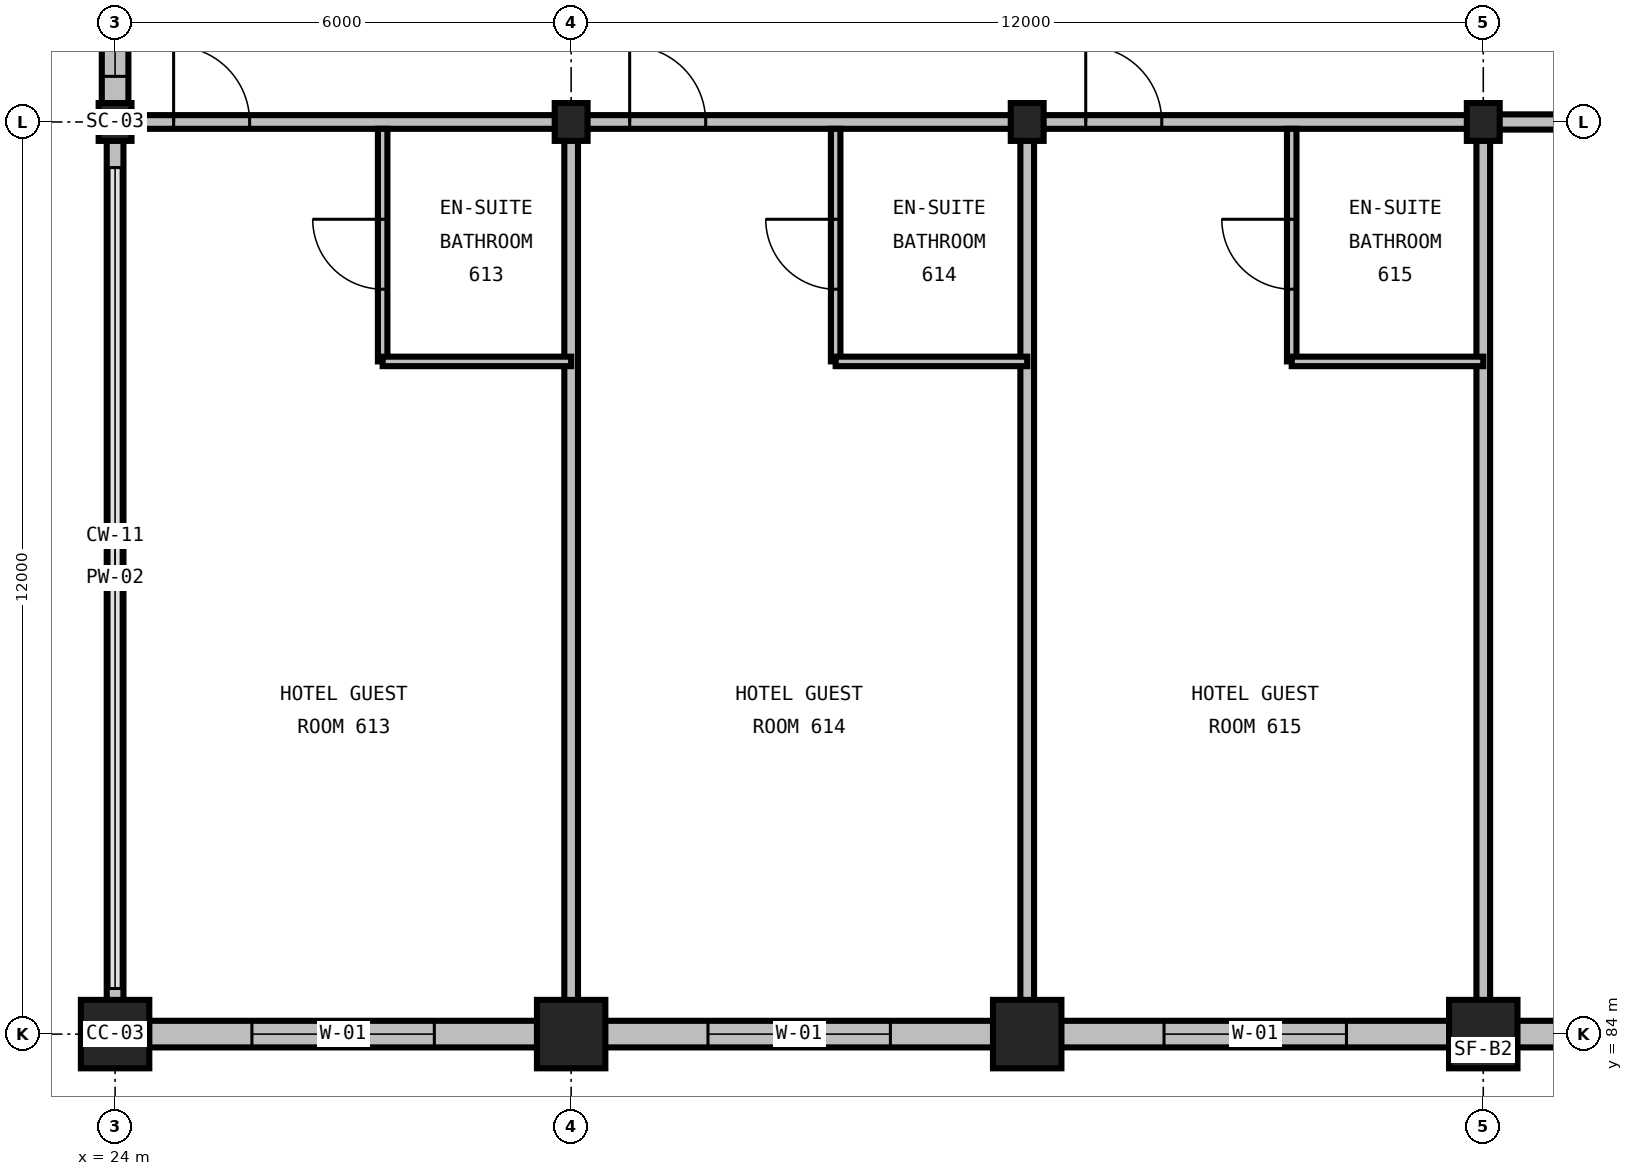
"""IFC4 building model, lengths in metres.
Left out: names, types, materials, properties, quantities, classifications, styles, units other than length and angle.
Written with IfcOpenShell. Run it as: python <this file> out.ifc"""

import sys

from ifc_helpers import new_model, si_unit, direction, frame, frame_2d, origin, origin_2d, place, context, subcontext, project, spatial, rectangle, i_section, extrude, element, fill, save


model = new_model("IFC4")
c1 = context("Model", 3, precision=1e-05, world=origin(), true_north=direction((0.0, 1.0)))
c2 = subcontext(c1, "Body", "Model", "MODEL_VIEW")
j1 = project(units=[si_unit("LENGTHUNIT", "METRE"), si_unit("PLANEANGLEUNIT", "RADIAN")], contexts=[c1])
p1 = place(None, origin())
s1 = spatial("IfcSite", under=j1, at=p1, CompositionType="ELEMENT")
p2 = place(p1, origin())
s2 = spatial("IfcBuilding", under=s1, at=p2, CompositionType="ELEMENT")
p3 = place(p2, frame((0.0, 0.0, 31.2)))
s3 = spatial("IfcBuildingStorey", under=s2, at=p3, CompositionType="ELEMENT", Elevation=31.2)
p4 = place(p3, frame((24.0, 84.0, 0.0), z_axis=(0.0, 0.0, 1.0), x_axis=(1.0, 0.0, 0.0)))
e1 = element("IfcColumn", 1, at=p4, inside=s3, PredefinedType="COLUMN", context=c2, shape_type="SweptSolid", body=[
    extrude(rectangle(XDim=0.9, YDim=0.9, at=origin_2d()), origin(), (0.0, 0.0, 1.0), 3.6),
])
p5 = place(p3, frame((24.0, 96.0, 0.0), z_axis=(0.0, 0.0, 1.0), x_axis=(1.0, 0.0, 0.0)))
e2 = element("IfcColumn", 2, at=p5, inside=s3, PredefinedType="COLUMN", context=c2, shape_type="SweptSolid", body=[
    extrude(i_section(OverallWidth=0.432, OverallDepth=0.498, WebThickness=0.056, FlangeThickness=0.089, FilletRadius=0.031, at=origin_2d()), origin(), (0.0, 0.0, 1.0), 3.6),
])
p6 = place(p3, frame((30.0, 84.0, 0.0), z_axis=(0.0, 0.0, 1.0), x_axis=(1.0, 0.0, 0.0)))
e3 = element("IfcColumn", 3, at=p6, inside=s3, PredefinedType="COLUMN", context=c2, shape_type="SweptSolid", body=[
    extrude(rectangle(XDim=0.9, YDim=0.9, at=origin_2d()), origin(), (0.0, 0.0, 1.0), 3.6),
])
p7 = place(p3, frame((30.0, 96.0, 0.0), z_axis=(0.0, 0.0, 1.0), x_axis=(1.0, 0.0, 0.0)))
e4 = element("IfcColumn", 4, at=p7, inside=s3, PredefinedType="COLUMN", context=c2, shape_type="SweptSolid", body=[
    extrude(i_section(OverallWidth=0.432, OverallDepth=0.498, WebThickness=0.056, FlangeThickness=0.089, FilletRadius=0.031, at=origin_2d()), origin(), (0.0, 0.0, 1.0), 3.6),
])
p8 = place(p3, frame((36.0, 84.0, 0.0), z_axis=(0.0, 0.0, 1.0), x_axis=(1.0, 0.0, 0.0)))
e5 = element("IfcColumn", 5, at=p8, inside=s3, PredefinedType="COLUMN", context=c2, shape_type="SweptSolid", body=[
    extrude(rectangle(XDim=0.9, YDim=0.9, at=origin_2d()), origin(), (0.0, 0.0, 1.0), 3.6),
])
p9 = place(p3, frame((36.0, 96.0, 0.0), z_axis=(0.0, 0.0, 1.0), x_axis=(1.0, 0.0, 0.0)))
e6 = element("IfcColumn", 6, at=p9, inside=s3, PredefinedType="COLUMN", context=c2, shape_type="SweptSolid", body=[
    extrude(i_section(OverallWidth=0.432, OverallDepth=0.498, WebThickness=0.056, FlangeThickness=0.089, FilletRadius=0.031, at=origin_2d()), origin(), (0.0, 0.0, 1.0), 3.6),
])
p10 = place(p3, frame((42.0, 84.0, 0.0), z_axis=(0.0, 0.0, 1.0), x_axis=(1.0, 0.0, 0.0)))
e7 = element("IfcColumn", 7, at=p10, inside=s3, PredefinedType="COLUMN", context=c2, shape_type="SweptSolid", body=[
    extrude(rectangle(XDim=0.9, YDim=0.9, at=origin_2d()), origin(), (0.0, 0.0, 1.0), 3.6),
])
p11 = place(p3, frame((42.0, 96.0, 0.0), z_axis=(0.0, 0.0, 1.0), x_axis=(1.0, 0.0, 0.0)))
e8 = element("IfcColumn", 8, at=p11, inside=s3, PredefinedType="COLUMN", context=c2, shape_type="SweptSolid", body=[
    extrude(i_section(OverallWidth=0.432, OverallDepth=0.498, WebThickness=0.056, FlangeThickness=0.089, FilletRadius=0.031, at=origin_2d()), origin(), (0.0, 0.0, 1.0), 3.6),
])
p12 = place(p3, frame((24.0, 84.0, 0.0), z_axis=(0.0, 0.0, 1.0), x_axis=(1.0, 0.0, 0.0)))
e9 = element("IfcWall", 9, at=p12, inside=s3, PredefinedType="STANDARD", context=c2, shape_type="SweptSolid", body=[
    extrude(rectangle(XDim=6.0, YDim=0.35, at=frame_2d((3.0, 0.0))), origin(), (0.0, 0.0, 1.0), 2.486),
])
p13 = place(p12, frame((1.8, 0.0, 0.75)))
e10 = element("IfcOpeningElement", 10, at=p13, cuts=e9, PredefinedType="OPENING", context=c2, shape_type="SweptSolid", body=[
    extrude(rectangle(XDim=2.4, YDim=1.65, at=frame_2d((1.2, 0.825))), frame((0.0, 0.19, 0.0), z_axis=(0.0, -1.0, 0.0), x_axis=(1.0, 0.0, 0.0)), (0.0, 0.0, 1.0), 0.38),
])
p14 = place(p3, frame((30.0, 84.0, 0.0), z_axis=(0.0, 0.0, 1.0), x_axis=(1.0, 0.0, 0.0)))
e11 = element("IfcWall", 11, at=p14, inside=s3, PredefinedType="STANDARD", context=c2, shape_type="SweptSolid", body=[
    extrude(rectangle(XDim=6.0, YDim=0.35, at=frame_2d((3.0, 0.0))), origin(), (0.0, 0.0, 1.0), 2.486),
])
p15 = place(p14, frame((1.8, 0.0, 0.75)))
e12 = element("IfcOpeningElement", 12, at=p15, cuts=e11, PredefinedType="OPENING", context=c2, shape_type="SweptSolid", body=[
    extrude(rectangle(XDim=2.4, YDim=1.65, at=frame_2d((1.2, 0.825))), frame((0.0, 0.19, 0.0), z_axis=(0.0, -1.0, 0.0), x_axis=(1.0, 0.0, 0.0)), (0.0, 0.0, 1.0), 0.38),
])
p16 = place(p3, frame((36.0, 84.0, 0.0), z_axis=(0.0, 0.0, 1.0), x_axis=(1.0, 0.0, 0.0)))
e13 = element("IfcWall", 13, at=p16, inside=s3, PredefinedType="STANDARD", context=c2, shape_type="SweptSolid", body=[
    extrude(rectangle(XDim=6.0, YDim=0.35, at=frame_2d((3.0, 0.0))), origin(), (0.0, 0.0, 1.0), 2.486),
])
p17 = place(p16, frame((1.8, 0.0, 0.75)))
e14 = element("IfcOpeningElement", 14, at=p17, cuts=e13, PredefinedType="OPENING", context=c2, shape_type="SweptSolid", body=[
    extrude(rectangle(XDim=2.4, YDim=1.65, at=frame_2d((1.2, 0.825))), frame((0.0, 0.19, 0.0), z_axis=(0.0, -1.0, 0.0), x_axis=(1.0, 0.0, 0.0)), (0.0, 0.0, 1.0), 0.38),
])
p18 = place(p3, frame((42.0, 84.0, 0.0), z_axis=(0.0, 0.0, 1.0), x_axis=(1.0, 0.0, 0.0)))
e15 = element("IfcWall", 15, at=p18, inside=s3, PredefinedType="STANDARD", context=c2, shape_type="SweptSolid", body=[
    extrude(rectangle(XDim=12.0, YDim=0.35, at=frame_2d((6.0, 0.0))), origin(), (0.0, 0.0, 1.0), 2.486),
])
p19 = place(p18, frame((1.8, 0.0, 0.75)))
e16 = element("IfcOpeningElement", 16, at=p19, cuts=e15, PredefinedType="OPENING", context=c2, shape_type="SweptSolid", body=[
    extrude(rectangle(XDim=2.4, YDim=1.65, at=frame_2d((1.2, 0.825))), frame((0.0, 0.19, 0.0), z_axis=(0.0, -1.0, 0.0), x_axis=(1.0, 0.0, 0.0)), (0.0, 0.0, 1.0), 0.38),
])
p20 = place(p18, frame((7.725, 0.0, 0.75)))
e17 = element("IfcOpeningElement", 17, at=p20, cuts=e15, PredefinedType="OPENING", context=c2, shape_type="SweptSolid", body=[
    extrude(rectangle(XDim=2.55, YDim=1.65, at=frame_2d((1.275, 0.825))), frame((0.0, 0.19, 0.0), z_axis=(0.0, -1.0, 0.0), x_axis=(1.0, 0.0, 0.0)), (0.0, 0.0, 1.0), 0.38),
])
p21 = place(p3, frame((24.0, 96.0, 0.0), z_axis=(0.0, 0.0, 1.0), x_axis=(0.0, -1.0, 0.0)))
e18 = element("IfcWall", 18, at=p21, inside=s3, PredefinedType="PARAPET", context=c2, shape_type="SweptSolid", body=[
    extrude(rectangle(XDim=12.0, YDim=0.22, at=frame_2d((6.0, 0.0))), origin(), (0.0, 0.0, 1.0), 0.2),
])
p22 = place(p3, frame((24.0, 105.0, 0.0), z_axis=(0.0, 0.0, 1.0), x_axis=(0.0, -1.0, 0.0)))
e19 = element("IfcWall", 19, at=p22, inside=s3, PredefinedType="STANDARD", context=c2, shape_type="SweptSolid", body=[
    extrude(rectangle(XDim=9.0, YDim=0.35, at=frame_2d((4.5, 0.0))), origin(), (0.0, 0.0, 1.0), 2.981),
])
p23 = place(p22, frame((6.6, 0.0, 0.85)))
e20 = element("IfcOpeningElement", 20, at=p23, cuts=e19, PredefinedType="OPENING", context=c2, shape_type="SweptSolid", body=[
    extrude(rectangle(XDim=1.8, YDim=1.5, at=frame_2d((0.9, 0.75))), frame((0.0, 0.19, 0.0), z_axis=(0.0, -1.0, 0.0), x_axis=(1.0, 0.0, 0.0)), (0.0, 0.0, 1.0), 0.38),
])
p24 = place(p3, frame((42.0, 96.0, 0.0), z_axis=(0.0, 0.0, 1.0), x_axis=(1.0, 0.0, 0.0)))
e21 = element("IfcWall", 21, at=p24, inside=s3, PredefinedType="PARTITIONING", context=c2, shape_type="SweptSolid", body=[
    extrude(rectangle(XDim=6.0, YDim=0.2, at=frame_2d((3.0, 0.0))), origin(), (0.0, 0.0, 1.0), 2.359),
])
p25 = place(p24, frame((2.4, 0.0, 0.0)))
e22 = element("IfcOpeningElement", 22, at=p25, cuts=e21, PredefinedType="OPENING", context=c2, shape_type="SweptSolid", body=[
    extrude(rectangle(XDim=1.8, YDim=2.3, at=frame_2d((0.9, 1.15))), frame((0.0, 0.115, 0.0), z_axis=(0.0, -1.0, 0.0), x_axis=(1.0, 0.0, 0.0)), (0.0, 0.0, 1.0), 0.23),
])
p26 = place(p3, frame((42.0, 84.175, 0.0), z_axis=(0.0, 0.0, 1.0), x_axis=(0.0, 1.0, 0.0)))
e23 = element("IfcWall", 23, at=p26, inside=s3, PredefinedType="PARTITIONING", context=c2, shape_type="SweptSolid", body=[
    extrude(rectangle(XDim=11.825, YDim=0.18, at=frame_2d((5.913, 0.0))), origin(), (0.0, 0.0, 1.0), 2.59),
])
p27 = place(p3, frame((24.085, 96.0, 0.0), z_axis=(0.0, 0.0, 1.0), x_axis=(1.0, 0.0, 0.0)))
e24 = element("IfcWall", 24, at=p27, inside=s3, PredefinedType="PARTITIONING", context=c2, shape_type="SweptSolid", body=[
    extrude(rectangle(XDim=5.915, YDim=0.18, at=frame_2d((2.957, 0.0))), origin(), (0.0, 0.0, 1.0), 2.736),
])
p28 = place(p27, frame((0.685, 0.0, 0.0)))
e25 = element("IfcOpeningElement", 25, at=p28, cuts=e24, PredefinedType="OPENING", context=c2, shape_type="SweptSolid", body=[
    extrude(rectangle(XDim=1.0, YDim=2.15, at=frame_2d((0.5, 1.075))), frame((0.0, 0.105, 0.0), z_axis=(0.0, -1.0, 0.0), x_axis=(1.0, 0.0, 0.0)), (0.0, 0.0, 1.0), 0.21),
])
p29 = place(p3, frame((30.0, 84.175, 0.0), z_axis=(0.0, 0.0, 1.0), x_axis=(0.0, 1.0, 0.0)))
e26 = element("IfcWall", 26, at=p29, inside=s3, PredefinedType="PARTITIONING", context=c2, shape_type="SweptSolid", body=[
    extrude(rectangle(XDim=11.825, YDim=0.18, at=frame_2d((5.913, 0.0))), origin(), (0.0, 0.0, 1.0), 2.59),
])
p30 = place(p3, frame((27.52, 92.85, 0.0), z_axis=(0.0, 0.0, 1.0), x_axis=(0.0, 1.0, 0.0)))
e27 = element("IfcWall", 27, at=p30, inside=s3, PredefinedType="PARTITIONING", context=c2, shape_type="SweptSolid", body=[
    extrude(rectangle(XDim=3.06, YDim=0.125, at=frame_2d((1.53, 0.0))), origin(), (0.0, 0.0, 1.0), 3.29),
])
p31 = place(p30, frame((0.95, 0.0, 0.0)))
e28 = element("IfcOpeningElement", 28, at=p31, cuts=e27, PredefinedType="OPENING", context=c2, shape_type="SweptSolid", body=[
    extrude(rectangle(XDim=0.92, YDim=2.1, at=frame_2d((0.46, 1.05))), frame((0.0, 0.077, 0.0), z_axis=(0.0, -1.0, 0.0), x_axis=(1.0, 0.0, 0.0)), (0.0, 0.0, 1.0), 0.155),
])
p32 = place(p3, frame((27.52, 92.85, 0.0), z_axis=(0.0, 0.0, 1.0), x_axis=(1.0, 0.0, 0.0)))
e29 = element("IfcWall", 29, at=p32, inside=s3, PredefinedType="PARTITIONING", context=c2, shape_type="SweptSolid", body=[
    extrude(rectangle(XDim=2.48, YDim=0.125, at=frame_2d((1.24, 0.0))), origin(), (0.0, 0.0, 1.0), 3.29),
])
p33 = place(p3, frame((30.0, 96.0, 0.0), z_axis=(0.0, 0.0, 1.0), x_axis=(1.0, 0.0, 0.0)))
e30 = element("IfcWall", 30, at=p33, inside=s3, PredefinedType="PARTITIONING", context=c2, shape_type="SweptSolid", body=[
    extrude(rectangle(XDim=6.0, YDim=0.18, at=frame_2d((3.0, 0.0))), origin(), (0.0, 0.0, 1.0), 2.736),
])
p34 = place(p33, frame((0.77, 0.0, 0.0)))
e31 = element("IfcOpeningElement", 31, at=p34, cuts=e30, PredefinedType="OPENING", context=c2, shape_type="SweptSolid", body=[
    extrude(rectangle(XDim=1.0, YDim=2.15, at=frame_2d((0.5, 1.075))), frame((0.0, 0.105, 0.0), z_axis=(0.0, -1.0, 0.0), x_axis=(1.0, 0.0, 0.0)), (0.0, 0.0, 1.0), 0.21),
])
p35 = place(p3, frame((36.0, 84.175, 0.0), z_axis=(0.0, 0.0, 1.0), x_axis=(0.0, 1.0, 0.0)))
e32 = element("IfcWall", 32, at=p35, inside=s3, PredefinedType="PARTITIONING", context=c2, shape_type="SweptSolid", body=[
    extrude(rectangle(XDim=11.825, YDim=0.18, at=frame_2d((5.913, 0.0))), origin(), (0.0, 0.0, 1.0), 2.59),
])
p36 = place(p3, frame((33.48, 92.85, 0.0), z_axis=(0.0, 0.0, 1.0), x_axis=(0.0, 1.0, 0.0)))
e33 = element("IfcWall", 33, at=p36, inside=s3, PredefinedType="PARTITIONING", context=c2, shape_type="SweptSolid", body=[
    extrude(rectangle(XDim=3.06, YDim=0.125, at=frame_2d((1.53, 0.0))), origin(), (0.0, 0.0, 1.0), 3.29),
])
p37 = place(p36, frame((0.95, 0.0, 0.0)))
e34 = element("IfcOpeningElement", 34, at=p37, cuts=e33, PredefinedType="OPENING", context=c2, shape_type="SweptSolid", body=[
    extrude(rectangle(XDim=0.92, YDim=2.1, at=frame_2d((0.46, 1.05))), frame((0.0, 0.077, 0.0), z_axis=(0.0, -1.0, 0.0), x_axis=(1.0, 0.0, 0.0)), (0.0, 0.0, 1.0), 0.155),
])
p38 = place(p3, frame((33.48, 92.85, 0.0), z_axis=(0.0, 0.0, 1.0), x_axis=(1.0, 0.0, 0.0)))
e35 = element("IfcWall", 35, at=p38, inside=s3, PredefinedType="PARTITIONING", context=c2, shape_type="SweptSolid", body=[
    extrude(rectangle(XDim=2.52, YDim=0.125, at=frame_2d((1.26, 0.0))), origin(), (0.0, 0.0, 1.0), 3.29),
])
p39 = place(p3, frame((36.0, 96.0, 0.0), z_axis=(0.0, 0.0, 1.0), x_axis=(1.0, 0.0, 0.0)))
e36 = element("IfcWall", 36, at=p39, inside=s3, PredefinedType="PARTITIONING", context=c2, shape_type="SweptSolid", body=[
    extrude(rectangle(XDim=6.0, YDim=0.18, at=frame_2d((3.0, 0.0))), origin(), (0.0, 0.0, 1.0), 2.736),
])
p40 = place(p39, frame((0.77, 0.0, 0.0)))
e37 = element("IfcOpeningElement", 37, at=p40, cuts=e36, PredefinedType="OPENING", context=c2, shape_type="SweptSolid", body=[
    extrude(rectangle(XDim=1.0, YDim=2.15, at=frame_2d((0.5, 1.075))), frame((0.0, 0.105, 0.0), z_axis=(0.0, -1.0, 0.0), x_axis=(1.0, 0.0, 0.0)), (0.0, 0.0, 1.0), 0.21),
])
p41 = place(p3, frame((39.48, 92.85, 0.0), z_axis=(0.0, 0.0, 1.0), x_axis=(0.0, 1.0, 0.0)))
e38 = element("IfcWall", 38, at=p41, inside=s3, PredefinedType="PARTITIONING", context=c2, shape_type="SweptSolid", body=[
    extrude(rectangle(XDim=3.06, YDim=0.125, at=frame_2d((1.53, 0.0))), origin(), (0.0, 0.0, 1.0), 3.29),
])
p42 = place(p41, frame((0.95, 0.0, 0.0)))
e39 = element("IfcOpeningElement", 39, at=p42, cuts=e38, PredefinedType="OPENING", context=c2, shape_type="SweptSolid", body=[
    extrude(rectangle(XDim=0.92, YDim=2.1, at=frame_2d((0.46, 1.05))), frame((0.0, 0.077, 0.0), z_axis=(0.0, -1.0, 0.0), x_axis=(1.0, 0.0, 0.0)), (0.0, 0.0, 1.0), 0.155),
])
p43 = place(p3, frame((39.48, 92.85, 0.0), z_axis=(0.0, 0.0, 1.0), x_axis=(1.0, 0.0, 0.0)))
e40 = element("IfcWall", 40, at=p43, inside=s3, PredefinedType="PARTITIONING", context=c2, shape_type="SweptSolid", body=[
    extrude(rectangle(XDim=2.52, YDim=0.125, at=frame_2d((1.26, 0.0))), origin(), (0.0, 0.0, 1.0), 3.29),
])
p44 = place(p13, origin())
e41 = element("IfcWindow", 41, at=p44, inside=s3, PartitioningType="DOUBLE_PANEL_VERTICAL", PredefinedType="WINDOW", context=c2, shape_type="SweptSolid", body=[
    extrude(rectangle(XDim=2.4, YDim=1.65, at=frame_2d((1.2, 0.825))), frame((0.0, 0.03, 0.0), z_axis=(0.0, -1.0, 0.0), x_axis=(1.0, 0.0, 0.0)), (0.0, 0.0, 1.0), 0.06),
])
fill(e10, e41)
p45 = place(p15, origin())
e42 = element("IfcWindow", 42, at=p45, inside=s3, PartitioningType="DOUBLE_PANEL_VERTICAL", PredefinedType="WINDOW", context=c2, shape_type="SweptSolid", body=[
    extrude(rectangle(XDim=2.4, YDim=1.65, at=frame_2d((1.2, 0.825))), frame((0.0, 0.03, 0.0), z_axis=(0.0, -1.0, 0.0), x_axis=(1.0, 0.0, 0.0)), (0.0, 0.0, 1.0), 0.06),
])
fill(e12, e42)
p46 = place(p17, origin())
e43 = element("IfcWindow", 43, at=p46, inside=s3, PartitioningType="DOUBLE_PANEL_VERTICAL", PredefinedType="WINDOW", context=c2, shape_type="SweptSolid", body=[
    extrude(rectangle(XDim=2.4, YDim=1.65, at=frame_2d((1.2, 0.825))), frame((0.0, 0.03, 0.0), z_axis=(0.0, -1.0, 0.0), x_axis=(1.0, 0.0, 0.0)), (0.0, 0.0, 1.0), 0.06),
])
fill(e14, e43)
p47 = place(p23, origin())
e44 = element("IfcWindow", 44, at=p47, inside=s3, PartitioningType="SINGLE_PANEL", PredefinedType="WINDOW", context=c2, shape_type="SweptSolid", body=[
    extrude(rectangle(XDim=1.8, YDim=1.5, at=frame_2d((0.9, 0.75))), frame((0.0, 0.03, 0.0), z_axis=(0.0, -1.0, 0.0), x_axis=(1.0, 0.0, 0.0)), (0.0, 0.0, 1.0), 0.06),
])
fill(e20, e44)
p48 = place(p28, origin())
e45 = element("IfcDoor", 45, at=p48, inside=s3, OperationType="SINGLE_SWING_LEFT", PredefinedType="DOOR", context=c2, shape_type="SweptSolid", body=[
    extrude(rectangle(XDim=1.0, YDim=2.15, at=frame_2d((0.5, 1.075))), frame((0.0, 0.025, 0.0), z_axis=(0.0, -1.0, 0.0), x_axis=(1.0, 0.0, 0.0)), (0.0, 0.0, 1.0), 0.05),
])
fill(e25, e45)
p49 = place(p31, origin())
e46 = element("IfcDoor", 46, at=p49, inside=s3, OperationType="SINGLE_SWING_RIGHT", PredefinedType="DOOR", context=c2, shape_type="SweptSolid", body=[
    extrude(rectangle(XDim=0.92, YDim=2.1, at=frame_2d((0.46, 1.05))), frame((0.0, 0.025, 0.0), z_axis=(0.0, -1.0, 0.0), x_axis=(1.0, 0.0, 0.0)), (0.0, 0.0, 1.0), 0.05),
])
fill(e28, e46)
p50 = place(p34, origin())
e47 = element("IfcDoor", 47, at=p50, inside=s3, OperationType="SINGLE_SWING_LEFT", PredefinedType="DOOR", context=c2, shape_type="SweptSolid", body=[
    extrude(rectangle(XDim=1.0, YDim=2.15, at=frame_2d((0.5, 1.075))), frame((0.0, 0.025, 0.0), z_axis=(0.0, -1.0, 0.0), x_axis=(1.0, 0.0, 0.0)), (0.0, 0.0, 1.0), 0.05),
])
fill(e31, e47)
p51 = place(p37, origin())
e48 = element("IfcDoor", 48, at=p51, inside=s3, OperationType="SINGLE_SWING_RIGHT", PredefinedType="DOOR", context=c2, shape_type="SweptSolid", body=[
    extrude(rectangle(XDim=0.92, YDim=2.1, at=frame_2d((0.46, 1.05))), frame((0.0, 0.025, 0.0), z_axis=(0.0, -1.0, 0.0), x_axis=(1.0, 0.0, 0.0)), (0.0, 0.0, 1.0), 0.05),
])
fill(e34, e48)
p52 = place(p40, origin())
e49 = element("IfcDoor", 49, at=p52, inside=s3, OperationType="SINGLE_SWING_LEFT", PredefinedType="DOOR", context=c2, shape_type="SweptSolid", body=[
    extrude(rectangle(XDim=1.0, YDim=2.15, at=frame_2d((0.5, 1.075))), frame((0.0, 0.025, 0.0), z_axis=(0.0, -1.0, 0.0), x_axis=(1.0, 0.0, 0.0)), (0.0, 0.0, 1.0), 0.05),
])
fill(e37, e49)
p53 = place(p42, origin())
e50 = element("IfcDoor", 50, at=p53, inside=s3, OperationType="SINGLE_SWING_RIGHT", PredefinedType="DOOR", context=c2, shape_type="SweptSolid", body=[
    extrude(rectangle(XDim=0.92, YDim=2.1, at=frame_2d((0.46, 1.05))), frame((0.0, 0.025, 0.0), z_axis=(0.0, -1.0, 0.0), x_axis=(1.0, 0.0, 0.0)), (0.0, 0.0, 1.0), 0.05),
])
fill(e39, e50)
save(model, sys.argv[1])
